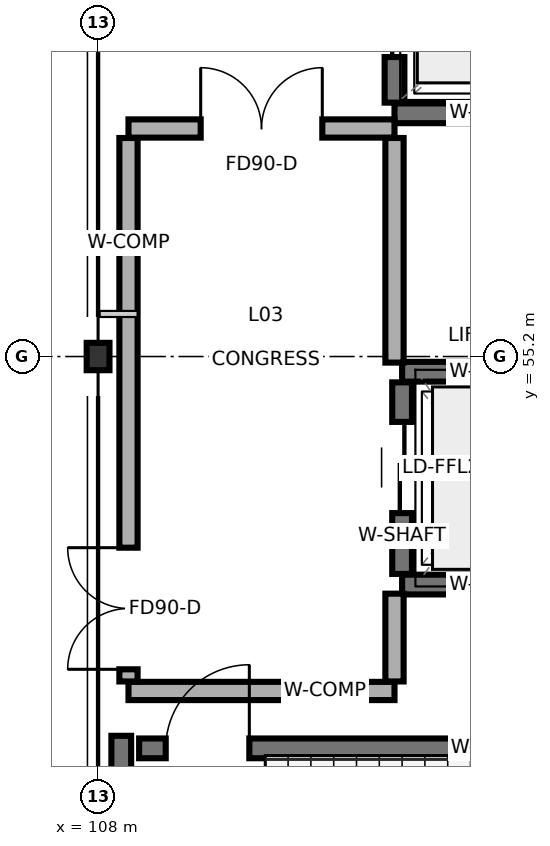
"""IFC4 building model, lengths in metres.
Left out: names, types, materials, properties, quantities, classifications, styles, units other than length and angle.
Written with IfcOpenShell. Run it as: python <this file> out.ifc"""

import sys

from ifc_helpers import new_model, si_unit, direction, frame, frame_2d, origin, origin_2d, place, context, subcontext, project, spatial, rectangle, i_section, extrude, element, fill, save


model = new_model("IFC4")
c1 = context("Model", 3, precision=1e-05, world=origin(), true_north=direction((0.0, 1.0)))
c2 = subcontext(c1, "Body", "Model", "MODEL_VIEW")
j1 = project(units=[si_unit("LENGTHUNIT", "METRE"), si_unit("PLANEANGLEUNIT", "RADIAN")], contexts=[c1])
p1 = place(None, origin())
s1 = spatial("IfcSite", under=j1, at=p1, CompositionType="ELEMENT")
p2 = place(p1, origin())
s2 = spatial("IfcBuilding", under=s1, at=p2, CompositionType="ELEMENT")
p3 = place(p2, frame((0.0, 0.0, 9.9)))
s3 = spatial("IfcBuildingStorey", under=s2, at=p3, CompositionType="ELEMENT", Elevation=9.9)
p4 = place(p3, frame((108.0, 55.2, 0.0), z_axis=(0.0, 0.0, 1.0), x_axis=(1.0, 0.0, 0.0)))
e1 = element("IfcColumn", 1, at=p4, inside=s3, PredefinedType="COLUMN", context=c2, shape_type="SweptSolid", body=[
    extrude(i_section(OverallWidth=0.3, OverallDepth=0.36, WebThickness=0.012, FlangeThickness=0.022, FilletRadius=0.027, at=origin_2d()), origin(), (0.0, 0.0, 1.0), 4.8),
])
p5 = place(p3, frame((108.305, 45.94, 0.0), z_axis=(0.0, 0.0, 1.0), x_axis=(0.0, 1.0, 0.0)))
e2 = element("IfcWall", 2, at=p5, inside=s3, PredefinedType="SHEAR", context=c2, shape_type="SweptSolid", body=[
    extrude(rectangle(XDim=4.27, YDim=0.26, at=frame_2d((2.135, 0.0))), origin(), (0.0, 0.0, 1.0), 4.54),
])
p6 = place(p3, frame((108.54, 50.045, 0.0), z_axis=(0.0, 0.0, 1.0), x_axis=(1.0, 0.0, 0.0)))
e3 = element("IfcWall", 3, at=p6, inside=s3, PredefinedType="SHEAR", context=c2, shape_type="SweptSolid", body=[
    extrude(rectangle(XDim=8.52, YDim=0.26, at=frame_2d((4.26, 0.0))), origin(), (0.0, 0.0, 1.0), 4.54),
])
p7 = place(p6, frame((0.35, 0.0, 0.0)))
e4 = element("IfcOpeningElement", 4, at=p7, cuts=e3, PredefinedType="OPENING", context=c2, shape_type="SweptSolid", body=[
    extrude(rectangle(XDim=1.1, YDim=2.2, at=frame_2d((0.55, 1.1))), frame((0.0, 0.14, 0.0), z_axis=(0.0, -1.0, 0.0), x_axis=(1.0, 0.0, 0.0)), (0.0, 0.0, 1.0), 0.28),
])
for number, where, z_axis, x_axis in (
    (5, (112.0, 52.2, 0.0), (0.0, 0.0, 1.0), (1.0, 0.0, 0.0)),
    (6, (112.0, 55.0, 0.0), (0.0, 0.0, 1.0), (1.0, 0.0, 0.0)),
):
    element("IfcWall", number, at=place(p3, frame(where, z_axis=z_axis, x_axis=x_axis)), inside=s3, PredefinedType="SHEAR", context=c2, shape_type="SweptSolid", body=[
        extrude(rectangle(XDim=2.4, YDim=0.26, at=frame_2d((1.2, 0.0))), origin(), (0.0, 0.0, 1.0), 4.085),
    ])
p8 = place(p3, frame((112.0, 52.34, 0.0), z_axis=(0.0, 0.0, 1.0), x_axis=(0.0, 1.0, 0.0)))
e7 = element("IfcWall", 7, at=p8, inside=s3, PredefinedType="SHEAR", context=c2, shape_type="SweptSolid", body=[
    extrude(rectangle(XDim=2.52, YDim=0.26, at=frame_2d((1.26, 0.0))), origin(), (0.0, 0.0, 1.0), 4.085),
])
p9 = place(p8, frame((0.8, 0.0, 0.0)))
e8 = element("IfcOpeningElement", 8, at=p9, cuts=e7, PredefinedType="OPENING", context=c2, shape_type="SweptSolid", body=[
    extrude(rectangle(XDim=1.2, YDim=2.2, at=frame_2d((0.6, 1.1))), frame((0.0, 0.14, 0.0), z_axis=(0.0, -1.0, 0.0), x_axis=(1.0, 0.0, 0.0)), (0.0, 0.0, 1.0), 0.28),
])
p10 = place(p3, frame((111.9, 58.4, 0.0), z_axis=(0.0, 0.0, 1.0), x_axis=(1.0, 0.0, 0.0)))
e9 = element("IfcWall", 9, at=p10, inside=s3, PredefinedType="SHEAR", context=c2, shape_type="SweptSolid", body=[
    extrude(rectangle(XDim=2.6, YDim=0.26, at=frame_2d((1.3, 0.0))), origin(), (0.0, 0.0, 1.0), 4.54),
])
p11 = place(p3, frame((111.9, 58.54, 0.0), z_axis=(0.0, 0.0, 1.0), x_axis=(0.0, 1.0, 0.0)))
e10 = element("IfcWall", 10, at=p11, inside=s3, PredefinedType="SHEAR", context=c2, shape_type="SweptSolid", body=[
    extrude(rectangle(XDim=2.12, YDim=0.26, at=frame_2d((1.06, 0.0))), origin(), (0.0, 0.0, 1.0), 4.54),
])
p12 = place(p11, frame((0.6, 0.0, 0.0)))
e11 = element("IfcOpeningElement", 11, at=p12, cuts=e10, PredefinedType="OPENING", context=c2, shape_type="SweptSolid", body=[
    extrude(rectangle(XDim=1.2, YDim=2.2, at=frame_2d((0.6, 1.1))), frame((0.0, 0.14, 0.0), z_axis=(0.0, -1.0, 0.0), x_axis=(1.0, 0.0, 0.0)), (0.0, 0.0, 1.0), 0.28),
])
p13 = place(p3, frame((108.4, 50.8, 0.0), z_axis=(0.0, 0.0, 1.0), x_axis=(1.0, 0.0, 0.0)))
e12 = element("IfcWall", 12, at=p13, inside=s3, PredefinedType="SOLIDWALL", context=c2, shape_type="SweptSolid", body=[
    extrude(rectangle(XDim=3.5, YDim=0.24, at=frame_2d((1.75, 0.0))), origin(), (0.0, 0.0, 1.0), 4.54),
])
p14 = place(p3, frame((108.4, 50.925, 0.0), z_axis=(0.0, 0.0, 1.0), x_axis=(0.0, 1.0, 0.0)))
e13 = element("IfcWall", 13, at=p14, inside=s3, PredefinedType="SOLIDWALL", context=c2, shape_type="SweptSolid", body=[
    extrude(rectangle(XDim=7.15, YDim=0.24, at=frame_2d((3.575, 0.0))), origin(), (0.0, 0.0, 1.0), 4.085),
])
p15 = place(p14, frame((0.16, 0.0, 0.0)))
e14 = element("IfcOpeningElement", 14, at=p15, cuts=e13, PredefinedType="OPENING", context=c2, shape_type="SweptSolid", body=[
    extrude(rectangle(XDim=1.6, YDim=2.2, at=frame_2d((0.8, 1.1))), frame((0.0, 0.13, 0.0), z_axis=(0.0, -1.0, 0.0), x_axis=(1.0, 0.0, 0.0)), (0.0, 0.0, 1.0), 0.26),
])
p16 = place(p3, frame((108.4, 58.2, 0.0), z_axis=(0.0, 0.0, 1.0), x_axis=(1.0, 0.0, 0.0)))
e15 = element("IfcWall", 15, at=p16, inside=s3, PredefinedType="SOLIDWALL", context=c2, shape_type="SweptSolid", body=[
    extrude(rectangle(XDim=3.5, YDim=0.24, at=frame_2d((1.75, 0.0))), origin(), (0.0, 0.0, 1.0), 4.54),
])
p17 = place(p16, frame((0.95, 0.0, 0.0)))
e16 = element("IfcOpeningElement", 16, at=p17, cuts=e15, PredefinedType="OPENING", context=c2, shape_type="SweptSolid", body=[
    extrude(rectangle(XDim=1.6, YDim=2.2, at=frame_2d((0.8, 1.1))), frame((0.0, 0.13, 0.0), z_axis=(0.0, -1.0, 0.0), x_axis=(1.0, 0.0, 0.0)), (0.0, 0.0, 1.0), 0.26),
])
p18 = place(p3, frame((111.9, 50.925, 0.0), z_axis=(0.0, 0.0, 1.0), x_axis=(0.0, 1.0, 0.0)))
e17 = element("IfcWall", 17, at=p18, inside=s3, PredefinedType="SOLIDWALL", context=c2, shape_type="SweptSolid", body=[
    extrude(rectangle(XDim=1.155, YDim=0.24, at=frame_2d((0.578, 0.0))), origin(), (0.0, 0.0, 1.0), 4.54),
])
p19 = place(p3, frame((111.9, 55.12, 0.0), z_axis=(0.0, 0.0, 1.0), x_axis=(0.0, 1.0, 0.0)))
e18 = element("IfcWall", 18, at=p19, inside=s3, PredefinedType="SOLIDWALL", context=c2, shape_type="SweptSolid", body=[
    extrude(rectangle(XDim=2.955, YDim=0.24, at=frame_2d((1.478, 0.0))), origin(), (0.0, 0.0, 1.0), 4.085),
])
p20 = place(p7, origin())
e19 = element("IfcDoor", 19, at=p20, inside=s3, OperationType="SINGLE_SWING_RIGHT", PredefinedType="DOOR", context=c2, shape_type="SweptSolid", body=[
    extrude(rectangle(XDim=1.1, YDim=2.2, at=frame_2d((0.55, 1.1))), frame((0.0, 0.025, 0.0), z_axis=(0.0, -1.0, 0.0), x_axis=(1.0, 0.0, 0.0)), (0.0, 0.0, 1.0), 0.05),
])
fill(e4, e19)
p21 = place(p9, origin())
e20 = element("IfcDoor", 20, at=p21, inside=s3, OperationType="SLIDING_TO_LEFT", PredefinedType="DOOR", context=c2, shape_type="SweptSolid", body=[
    extrude(rectangle(XDim=1.2, YDim=2.2, at=frame_2d((0.6, 1.1))), frame((0.0, 0.025, 0.0), z_axis=(0.0, -1.0, 0.0), x_axis=(1.0, 0.0, 0.0)), (0.0, 0.0, 1.0), 0.05),
])
fill(e8, e20)
p22 = place(p12, origin())
e21 = element("IfcDoor", 21, at=p22, inside=s3, OperationType="SLIDING_TO_RIGHT", PredefinedType="DOOR", context=c2, shape_type="SweptSolid", body=[
    extrude(rectangle(XDim=1.2, YDim=2.2, at=frame_2d((0.6, 1.1))), frame((0.0, 0.025, 0.0), z_axis=(0.0, -1.0, 0.0), x_axis=(1.0, 0.0, 0.0)), (0.0, 0.0, 1.0), 0.05),
])
fill(e11, e21)
p23 = place(p15, origin())
e22 = element("IfcDoor", 22, at=p23, inside=s3, OperationType="DOUBLE_DOOR_SINGLE_SWING", PredefinedType="DOOR", context=c2, shape_type="SweptSolid", body=[
    extrude(rectangle(XDim=1.6, YDim=2.2, at=frame_2d((0.8, 1.1))), frame((0.0, 0.025, 0.0), z_axis=(0.0, -1.0, 0.0), x_axis=(1.0, 0.0, 0.0)), (0.0, 0.0, 1.0), 0.05),
])
fill(e14, e22)
p24 = place(p17, origin())
e23 = element("IfcDoor", 23, at=p24, inside=s3, OperationType="DOUBLE_DOOR_SINGLE_SWING", PredefinedType="DOOR", context=c2, shape_type="SweptSolid", body=[
    extrude(rectangle(XDim=1.6, YDim=2.2, at=frame_2d((0.8, 1.1))), frame((0.0, 0.025, 0.0), z_axis=(0.0, -1.0, 0.0), x_axis=(1.0, 0.0, 0.0)), (0.0, 0.0, 1.0), 0.05),
])
fill(e16, e23)
save(model, sys.argv[1])
